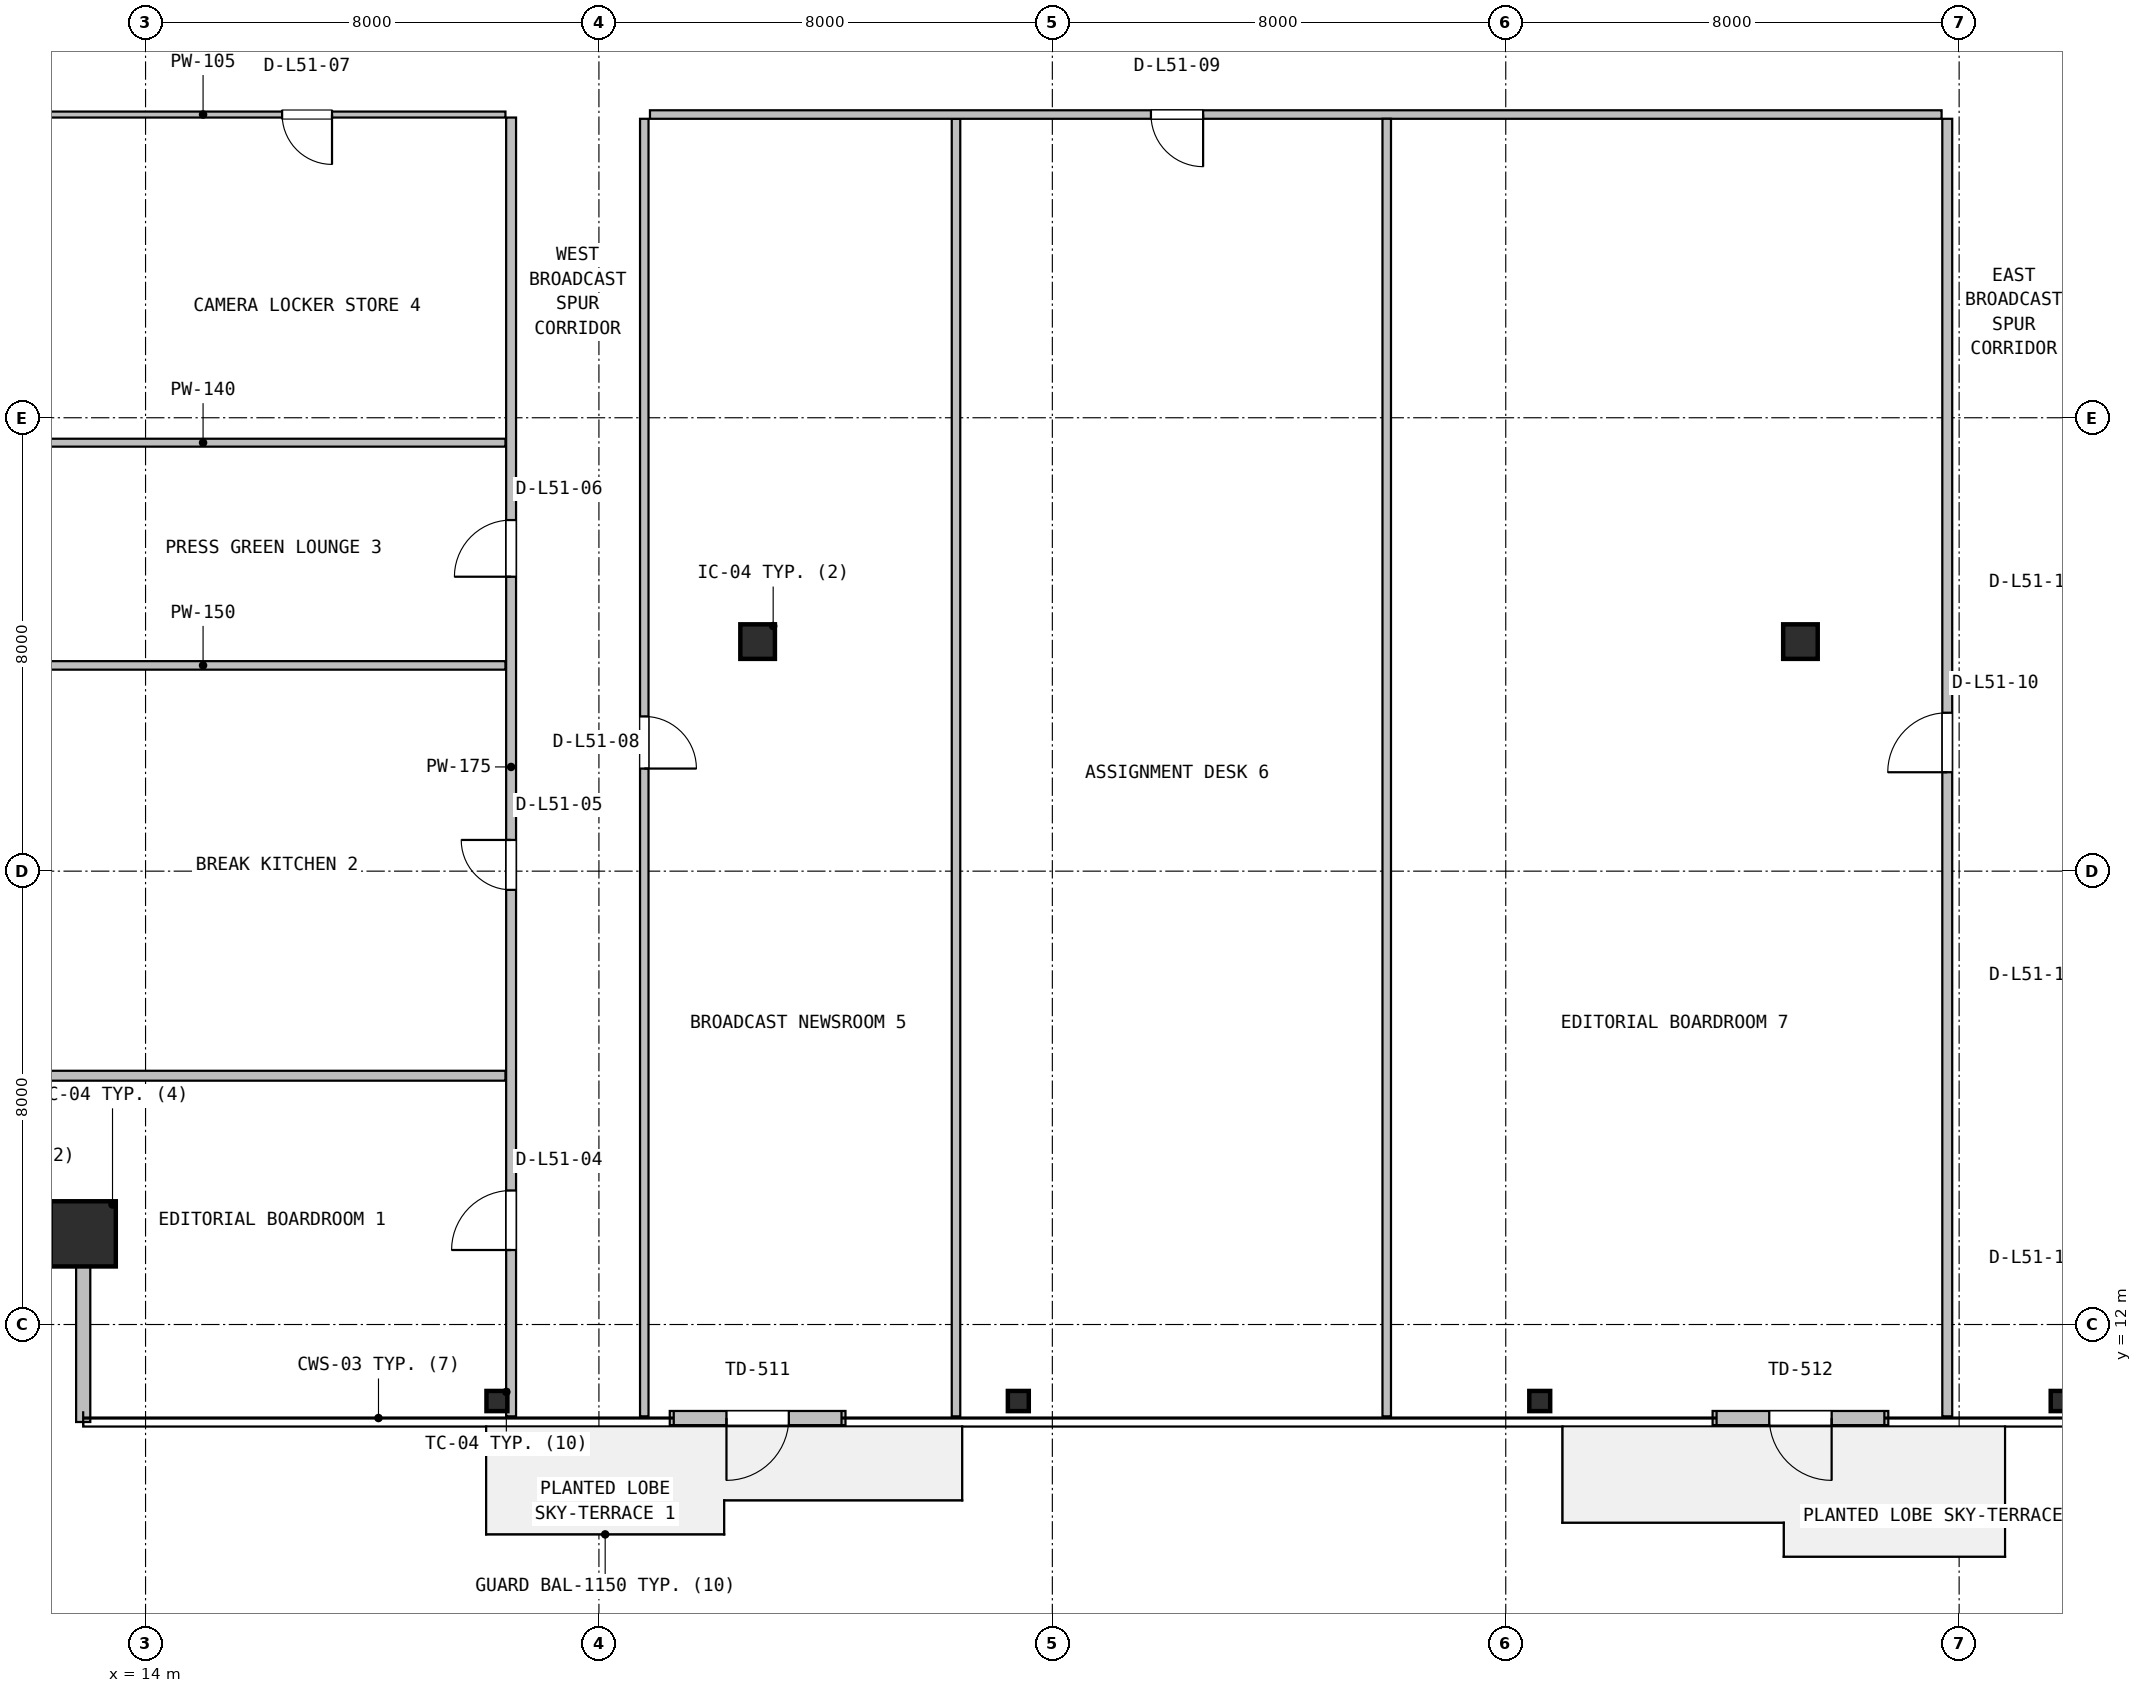
"""IFC4 building model, lengths in metres.
Left out: names, types, materials, properties, quantities, classifications, styles, units other than length and angle.
Written with IfcOpenShell. Run it as: python <this file> out.ifc"""

import sys

from ifc_helpers import new_model, si_unit, direction, frame, frame_2d, origin, origin_2d, place, context, subcontext, project, spatial, rectangle, hollow_rectangle, hollow_circle, i_section, extrude, source, transform, mapped, element, fill, save


model = new_model("IFC4")
c1 = context("Model", 3, precision=1e-05, world=origin(), true_north=direction((0.0, 1.0)))
c2 = subcontext(c1, "Body", "Model", "MODEL_VIEW")
j1 = project(units=[si_unit("LENGTHUNIT", "METRE"), si_unit("PLANEANGLEUNIT", "RADIAN")], contexts=[c1])
p1 = place(None, origin())
s1 = spatial("IfcSite", under=j1, at=p1, CompositionType="ELEMENT")
p2 = place(p1, origin())
s2 = spatial("IfcBuilding", under=s1, at=p2, CompositionType="ELEMENT")
p3 = place(p2, frame((0.0, 0.0, 207.4)))
s3 = spatial("IfcBuildingStorey", under=s2, at=p3, CompositionType="ELEMENT", Elevation=207.4)
m1 = source(origin(), c2, "Body", "SweptSolid", [
    extrude(hollow_rectangle(XDim=1.15, YDim=1.15, WallThickness=0.045, at=origin_2d()), origin(), (0.0, 0.0, 1.0), 3.8),
])
p4 = place(p3, frame((12.9, 13.6, 0.0), z_axis=(0.0, 0.0, 1.0), x_axis=(1.0, 0.0, 0.0)))
e1 = element("IfcColumn", 1, at=p4, inside=s3, PredefinedType="COLUMN", context=c2, shape_type="MappedRepresentation", body=[
    mapped(m1, transform((0.0, 0.0, 0.0), x_axis=(1.0, 0.0, 0.0), y_axis=(0.0, 1.0, 0.0), z_axis=(0.0, 0.0, 1.0), scale=1.0)),
])
m2 = source(origin(), c2, "Body", "SweptSolid", [
    extrude(i_section(OverallWidth=0.369, OverallDepth=0.356, WebThickness=0.011, FlangeThickness=0.018, FilletRadius=0.016, at=origin_2d()), origin(), (0.0, 0.0, 1.0), 3.8),
])
for number, where, z_axis, x_axis in (
    (2, (20.2, 10.65, 0.0), (0.0, 0.0, 1.0), (1.0, 0.0, 0.0)),
    (3, (29.4, 10.65, 0.0), (0.0, 0.0, 1.0), (1.0, 0.0, 0.0)),
    (4, (38.6, 10.65, 0.0), (0.0, 0.0, 1.0), (1.0, 0.0, 0.0)),
    (5, (47.8, 10.65, 0.0), (0.0, 0.0, 1.0), (1.0, 0.0, 0.0)),
):
    element("IfcColumn", number, at=place(p3, frame(where, z_axis=z_axis, x_axis=x_axis)), inside=s3, PredefinedType="COLUMN", context=c2, shape_type="MappedRepresentation", body=[
        mapped(m2, transform((0.0, 0.0, 0.0), x_axis=(1.0, 0.0, 0.0), y_axis=(0.0, 1.0, 0.0), z_axis=(0.0, 0.0, 1.0), scale=1.0)),
    ])
m3 = source(origin(), c2, "Body", "SweptSolid", [
    extrude(hollow_circle(Radius=0.305, WallThickness=0.025, at=origin_2d()), origin(), (0.0, 0.0, 1.0), 3.8),
])
for number, where, z_axis, x_axis in (
    (6, (24.8, 24.05, 0.0), (0.0, 0.0, 1.0), (1.0, 0.0, 0.0)),
    (7, (43.2, 24.05, 0.0), (0.0, 0.0, 1.0), (1.0, 0.0, 0.0)),
):
    element("IfcColumn", number, at=place(p3, frame(where, z_axis=z_axis, x_axis=x_axis)), inside=s3, PredefinedType="COLUMN", context=c2, shape_type="MappedRepresentation", body=[
        mapped(m3, transform((0.0, 0.0, 0.0), x_axis=(1.0, 0.0, 0.0), y_axis=(0.0, 1.0, 0.0), z_axis=(0.0, 0.0, 1.0), scale=1.0)),
    ])
p5 = place(p3, frame((23.25, 10.35, 0.0), z_axis=(0.0, 0.0, 1.0), x_axis=(1.0, 0.0, 0.0)))
e8 = element("IfcWall", 8, at=p5, inside=s3, PredefinedType="SOLIDWALL", context=c2, shape_type="SweptSolid", body=[
    extrude(rectangle(XDim=3.1, YDim=0.25, at=frame_2d((1.55, 0.0))), origin(), (0.0, 0.0, 1.0), 3.53),
])
p6 = place(p5, frame((1.0, 0.0, 0.0)))
e9 = element("IfcOpeningElement", 9, at=p6, cuts=e8, PredefinedType="OPENING", context=c2, shape_type="SweptSolid", body=[
    extrude(rectangle(XDim=1.1, YDim=2.15, at=frame_2d((0.55, 1.075))), frame((0.0, 0.135, 0.0), z_axis=(0.0, -1.0, 0.0), x_axis=(1.0, 0.0, 0.0)), (0.0, 0.0, 1.0), 0.27),
])
p7 = place(p3, frame((41.65, 10.35, 0.0), z_axis=(0.0, 0.0, 1.0), x_axis=(1.0, 0.0, 0.0)))
e10 = element("IfcWall", 10, at=p7, inside=s3, PredefinedType="SOLIDWALL", context=c2, shape_type="SweptSolid", body=[
    extrude(rectangle(XDim=3.1, YDim=0.25, at=frame_2d((1.55, 0.0))), origin(), (0.0, 0.0, 1.0), 3.53),
])
p8 = place(p7, frame((1.0, 0.0, 0.0)))
e11 = element("IfcOpeningElement", 11, at=p8, cuts=e10, PredefinedType="OPENING", context=c2, shape_type="SweptSolid", body=[
    extrude(rectangle(XDim=1.1, YDim=2.15, at=frame_2d((0.55, 1.075))), frame((0.0, 0.135, 0.0), z_axis=(0.0, -1.0, 0.0), x_axis=(1.0, 0.0, 0.0)), (0.0, 0.0, 1.0), 0.27),
])
p9 = place(p3, frame((12.9, 10.28, 0.0), z_axis=(0.0, 0.0, 1.0), x_axis=(0.0, 1.0, 0.0)))
e12 = element("IfcWall", 12, at=p9, inside=s3, PredefinedType="SOLIDWALL", context=c2, shape_type="SweptSolid", body=[
    extrude(rectangle(XDim=3.4, YDim=0.25, at=frame_2d((1.7, 0.0))), origin(), (0.0, 0.0, 1.0), 3.171),
])
p10 = place(p3, frame((20.45, 10.38, 0.0), z_axis=(0.0, 0.0, 1.0), x_axis=(0.0, 1.0, 0.0)))
e13 = element("IfcWall", 13, at=p10, inside=s3, PredefinedType="PARTITIONING", context=c2, shape_type="SweptSolid", body=[
    extrude(rectangle(XDim=22.917, YDim=0.175, at=frame_2d((11.458, 0.0))), origin(), (0.0, 0.0, 1.0), 3.171),
])
p11 = place(p10, frame((2.935, 0.0, 0.0)))
e14 = element("IfcOpeningElement", 14, at=p11, cuts=e13, PredefinedType="OPENING", context=c2, shape_type="SweptSolid", body=[
    extrude(rectangle(XDim=1.05, YDim=2.1, at=frame_2d((0.525, 1.05))), frame((0.0, 0.098, 0.0), z_axis=(0.0, -1.0, 0.0), x_axis=(1.0, 0.0, 0.0)), (0.0, 0.0, 1.0), 0.195),
])
p12 = place(p10, frame((9.29, 0.0, 0.0)))
e15 = element("IfcOpeningElement", 15, at=p12, cuts=e13, PredefinedType="OPENING", context=c2, shape_type="SweptSolid", body=[
    extrude(rectangle(XDim=0.88, YDim=2.06, at=frame_2d((0.44, 1.03))), frame((0.0, 0.098, 0.0), z_axis=(0.0, -1.0, 0.0), x_axis=(1.0, 0.0, 0.0)), (0.0, 0.0, 1.0), 0.195),
])
p13 = place(p10, frame((14.815, 0.0, 0.0)))
e16 = element("IfcOpeningElement", 16, at=p13, cuts=e13, PredefinedType="OPENING", context=c2, shape_type="SweptSolid", body=[
    extrude(rectangle(XDim=1.0, YDim=2.1, at=frame_2d((0.5, 1.05))), frame((0.0, 0.098, 0.0), z_axis=(0.0, -1.0, 0.0), x_axis=(1.0, 0.0, 0.0)), (0.0, 0.0, 1.0), 0.195),
])
p14 = place(p3, frame((9.68, 16.39, 0.0), z_axis=(0.0, 0.0, 1.0), x_axis=(1.0, 0.0, 0.0)))
e17 = element("IfcWall", 17, at=p14, inside=s3, PredefinedType="PARTITIONING", context=c2, shape_type="SweptSolid", body=[
    extrude(rectangle(XDim=10.67, YDim=0.175, at=frame_2d((5.335, 0.0))), origin(), (0.0, 0.0, 1.0), 3.171),
])
p15 = place(p3, frame((9.68, 23.63, 0.0), z_axis=(0.0, 0.0, 1.0), x_axis=(1.0, 0.0, 0.0)))
e18 = element("IfcWall", 18, at=p15, inside=s3, PredefinedType="PARTITIONING", context=c2, shape_type="SweptSolid", body=[
    extrude(rectangle(XDim=10.67, YDim=0.15, at=frame_2d((5.335, 0.0))), origin(), (0.0, 0.0, 1.0), 3.171),
])
p16 = place(p3, frame((9.68, 27.56, 0.0), z_axis=(0.0, 0.0, 1.0), x_axis=(1.0, 0.0, 0.0)))
e19 = element("IfcWall", 19, at=p16, inside=s3, PredefinedType="PARTITIONING", context=c2, shape_type="SweptSolid", body=[
    extrude(rectangle(XDim=10.67, YDim=0.14, at=frame_2d((5.335, 0.0))), origin(), (0.0, 0.0, 1.0), 3.171),
])
p17 = place(p3, frame((9.68, 33.35, 0.0), z_axis=(0.0, 0.0, 1.0), x_axis=(1.0, 0.0, 0.0)))
e20 = element("IfcWall", 20, at=p17, inside=s3, PredefinedType="PARTITIONING", context=c2, shape_type="SweptSolid", body=[
    extrude(rectangle(XDim=10.67, YDim=0.105, at=frame_2d((5.335, 0.0))), origin(), (0.0, 0.0, 1.0), 3.171),
])
p18 = place(p17, frame((6.73, 0.0, 0.0)))
e21 = element("IfcOpeningElement", 21, at=p18, cuts=e20, PredefinedType="OPENING", context=c2, shape_type="SweptSolid", body=[
    extrude(rectangle(XDim=0.88, YDim=2.06, at=frame_2d((0.44, 1.03))), frame((0.0, 0.062, 0.0), z_axis=(0.0, -1.0, 0.0), x_axis=(1.0, 0.0, 0.0)), (0.0, 0.0, 1.0), 0.125),
])
p19 = place(p3, frame((28.3, 10.38, 0.0), z_axis=(0.0, 0.0, 1.0), x_axis=(0.0, 1.0, 0.0)))
e22 = element("IfcWall", 22, at=p19, inside=s3, PredefinedType="PARTITIONING", context=c2, shape_type="SweptSolid", body=[
    extrude(rectangle(XDim=22.895, YDim=0.15, at=frame_2d((11.448, 0.0))), origin(), (0.0, 0.0, 1.0), 2.908),
])
p20 = place(p3, frame((22.9, 33.35, 0.0), z_axis=(0.0, 0.0, 1.0), x_axis=(1.0, 0.0, 0.0)))
e23 = element("IfcWall", 23, at=p20, inside=s3, PredefinedType="PARTITIONING", context=c2, shape_type="SweptSolid", body=[
    extrude(rectangle(XDim=22.79, YDim=0.15, at=frame_2d((11.395, 0.0))), origin(), (0.0, 0.0, 1.0), 2.908),
])
p21 = place(p20, frame((8.84, 0.0, 0.0)))
e24 = element("IfcOpeningElement", 24, at=p21, cuts=e23, PredefinedType="OPENING", context=c2, shape_type="SweptSolid", body=[
    extrude(rectangle(XDim=0.92, YDim=2.08, at=frame_2d((0.46, 1.04))), frame((0.0, 0.085, 0.0), z_axis=(0.0, -1.0, 0.0), x_axis=(1.0, 0.0, 0.0)), (0.0, 0.0, 1.0), 0.17),
])
p22 = place(p3, frame((22.8, 10.38, 0.0), z_axis=(0.0, 0.0, 1.0), x_axis=(0.0, 1.0, 0.0)))
e25 = element("IfcWall", 25, at=p22, inside=s3, PredefinedType="PARTITIONING", context=c2, shape_type="SweptSolid", body=[
    extrude(rectangle(XDim=22.895, YDim=0.15, at=frame_2d((11.448, 0.0))), origin(), (0.0, 0.0, 1.0), 3.171),
])
p23 = place(p22, frame((11.43, 0.0, 0.0)))
e26 = element("IfcOpeningElement", 26, at=p23, cuts=e25, PredefinedType="OPENING", context=c2, shape_type="SweptSolid", body=[
    extrude(rectangle(XDim=0.92, YDim=2.08, at=frame_2d((0.46, 1.04))), frame((0.0, 0.085, 0.0), z_axis=(0.0, -1.0, 0.0), x_axis=(1.0, 0.0, 0.0)), (0.0, 0.0, 1.0), 0.17),
])
p24 = place(p3, frame((35.9, 10.38, 0.0), z_axis=(0.0, 0.0, 1.0), x_axis=(0.0, 1.0, 0.0)))
e27 = element("IfcWall", 27, at=p24, inside=s3, PredefinedType="PARTITIONING", context=c2, shape_type="SweptSolid", body=[
    extrude(rectangle(XDim=22.895, YDim=0.15, at=frame_2d((11.448, 0.0))), origin(), (0.0, 0.0, 1.0), 2.908),
])
p25 = place(p3, frame((45.79, 10.38, 0.0), z_axis=(0.0, 0.0, 1.0), x_axis=(0.0, 1.0, 0.0)))
e28 = element("IfcWall", 28, at=p25, inside=s3, PredefinedType="PARTITIONING", context=c2, shape_type="SweptSolid", body=[
    extrude(rectangle(XDim=22.895, YDim=0.175, at=frame_2d((11.448, 0.0))), origin(), (0.0, 0.0, 1.0), 2.908),
])
p26 = place(p25, frame((11.365, 0.0, 0.0)))
e29 = element("IfcOpeningElement", 29, at=p26, cuts=e28, PredefinedType="OPENING", context=c2, shape_type="SweptSolid", body=[
    extrude(rectangle(XDim=1.05, YDim=2.1, at=frame_2d((0.525, 1.05))), frame((0.0, 0.098, 0.0), z_axis=(0.0, -1.0, 0.0), x_axis=(1.0, 0.0, 0.0)), (0.0, 0.0, 1.0), 0.195),
])
m4 = source(origin(), c2, "Body", "SweptSolid", [
    extrude(rectangle(XDim=1.1, YDim=2.15, at=frame_2d((0.55, 1.075))), frame((0.0, 0.025, 0.0), z_axis=(0.0, -1.0, 0.0), x_axis=(1.0, 0.0, 0.0)), (0.0, 0.0, 1.0), 0.05),
])
p27 = place(p6, frame((1.1, 0.0, 0.0), z_axis=(0.0, 0.0, 1.0), x_axis=(-1.0, 0.0, 0.0)))
e30 = element("IfcDoor", 30, at=p27, inside=s3, OperationType="SINGLE_SWING_LEFT", PredefinedType="DOOR", context=c2, shape_type="MappedRepresentation", body=[
    mapped(m4, transform((0.0, 0.0, 0.0), x_axis=(1.0, 0.0, 0.0), y_axis=(0.0, 1.0, 0.0), z_axis=(0.0, 0.0, 1.0), scale=1.0)),
])
fill(e9, e30)
p28 = place(p8, frame((1.1, 0.0, 0.0), z_axis=(0.0, 0.0, 1.0), x_axis=(-1.0, 0.0, 0.0)))
e31 = element("IfcDoor", 31, at=p28, inside=s3, OperationType="SINGLE_SWING_RIGHT", PredefinedType="DOOR", context=c2, shape_type="MappedRepresentation", body=[
    mapped(m4, transform((0.0, 0.0, 0.0), x_axis=(1.0, 0.0, 0.0), y_axis=(0.0, 1.0, 0.0), z_axis=(0.0, 0.0, 1.0), scale=1.0)),
])
fill(e11, e31)
m5 = source(origin(), c2, "Body", "SweptSolid", [
    extrude(rectangle(XDim=1.05, YDim=2.1, at=frame_2d((0.525, 1.05))), frame((0.0, 0.025, 0.0), z_axis=(0.0, -1.0, 0.0), x_axis=(1.0, 0.0, 0.0)), (0.0, 0.0, 1.0), 0.05),
])
p29 = place(p11, origin())
e32 = element("IfcDoor", 32, at=p29, inside=s3, OperationType="SINGLE_SWING_LEFT", PredefinedType="DOOR", context=c2, shape_type="MappedRepresentation", body=[
    mapped(m5, transform((0.0, 0.0, 0.0), x_axis=(1.0, 0.0, 0.0), y_axis=(0.0, 1.0, 0.0), z_axis=(0.0, 0.0, 1.0), scale=1.0)),
])
fill(e14, e32)
m6 = source(origin(), c2, "Body", "SweptSolid", [
    extrude(rectangle(XDim=0.88, YDim=2.06, at=frame_2d((0.44, 1.03))), frame((0.0, 0.025, 0.0), z_axis=(0.0, -1.0, 0.0), x_axis=(1.0, 0.0, 0.0)), (0.0, 0.0, 1.0), 0.05),
])
p30 = place(p12, origin())
e33 = element("IfcDoor", 33, at=p30, inside=s3, OperationType="SINGLE_SWING_RIGHT", PredefinedType="DOOR", context=c2, shape_type="MappedRepresentation", body=[
    mapped(m6, transform((0.0, 0.0, 0.0), x_axis=(1.0, 0.0, 0.0), y_axis=(0.0, 1.0, 0.0), z_axis=(0.0, 0.0, 1.0), scale=1.0)),
])
fill(e15, e33)
m7 = source(origin(), c2, "Body", "SweptSolid", [
    extrude(rectangle(XDim=1.0, YDim=2.1, at=frame_2d((0.5, 1.05))), frame((0.0, 0.025, 0.0), z_axis=(0.0, -1.0, 0.0), x_axis=(1.0, 0.0, 0.0)), (0.0, 0.0, 1.0), 0.05),
])
p31 = place(p13, origin())
e34 = element("IfcDoor", 34, at=p31, inside=s3, OperationType="SINGLE_SWING_LEFT", PredefinedType="DOOR", context=c2, shape_type="MappedRepresentation", body=[
    mapped(m7, transform((0.0, 0.0, 0.0), x_axis=(1.0, 0.0, 0.0), y_axis=(0.0, 1.0, 0.0), z_axis=(0.0, 0.0, 1.0), scale=1.0)),
])
fill(e16, e34)
p32 = place(p18, frame((0.88, 0.0, 0.0), z_axis=(0.0, 0.0, 1.0), x_axis=(-1.0, 0.0, 0.0)))
e35 = element("IfcDoor", 35, at=p32, inside=s3, OperationType="SINGLE_SWING_RIGHT", PredefinedType="DOOR", context=c2, shape_type="MappedRepresentation", body=[
    mapped(m6, transform((0.0, 0.0, 0.0), x_axis=(1.0, 0.0, 0.0), y_axis=(0.0, 1.0, 0.0), z_axis=(0.0, 0.0, 1.0), scale=1.0)),
])
fill(e21, e35)
m8 = source(origin(), c2, "Body", "SweptSolid", [
    extrude(rectangle(XDim=0.92, YDim=2.08, at=frame_2d((0.46, 1.04))), frame((0.0, 0.025, 0.0), z_axis=(0.0, -1.0, 0.0), x_axis=(1.0, 0.0, 0.0)), (0.0, 0.0, 1.0), 0.05),
])
p33 = place(p23, frame((0.92, 0.0, 0.0), z_axis=(0.0, 0.0, 1.0), x_axis=(-1.0, 0.0, 0.0)))
e36 = element("IfcDoor", 36, at=p33, inside=s3, OperationType="SINGLE_SWING_LEFT", PredefinedType="DOOR", context=c2, shape_type="MappedRepresentation", body=[
    mapped(m8, transform((0.0, 0.0, 0.0), x_axis=(1.0, 0.0, 0.0), y_axis=(0.0, 1.0, 0.0), z_axis=(0.0, 0.0, 1.0), scale=1.0)),
])
fill(e26, e36)
p34 = place(p21, frame((0.92, 0.0, 0.0), z_axis=(0.0, 0.0, 1.0), x_axis=(-1.0, 0.0, 0.0)))
e37 = element("IfcDoor", 37, at=p34, inside=s3, OperationType="SINGLE_SWING_RIGHT", PredefinedType="DOOR", context=c2, shape_type="MappedRepresentation", body=[
    mapped(m8, transform((0.0, 0.0, 0.0), x_axis=(1.0, 0.0, 0.0), y_axis=(0.0, 1.0, 0.0), z_axis=(0.0, 0.0, 1.0), scale=1.0)),
])
fill(e24, e37)
p35 = place(p26, origin())
e38 = element("IfcDoor", 38, at=p35, inside=s3, OperationType="SINGLE_SWING_LEFT", PredefinedType="DOOR", context=c2, shape_type="MappedRepresentation", body=[
    mapped(m5, transform((0.0, 0.0, 0.0), x_axis=(1.0, 0.0, 0.0), y_axis=(0.0, 1.0, 0.0), z_axis=(0.0, 0.0, 1.0), scale=1.0)),
])
fill(e29, e38)
save(model, sys.argv[1])
